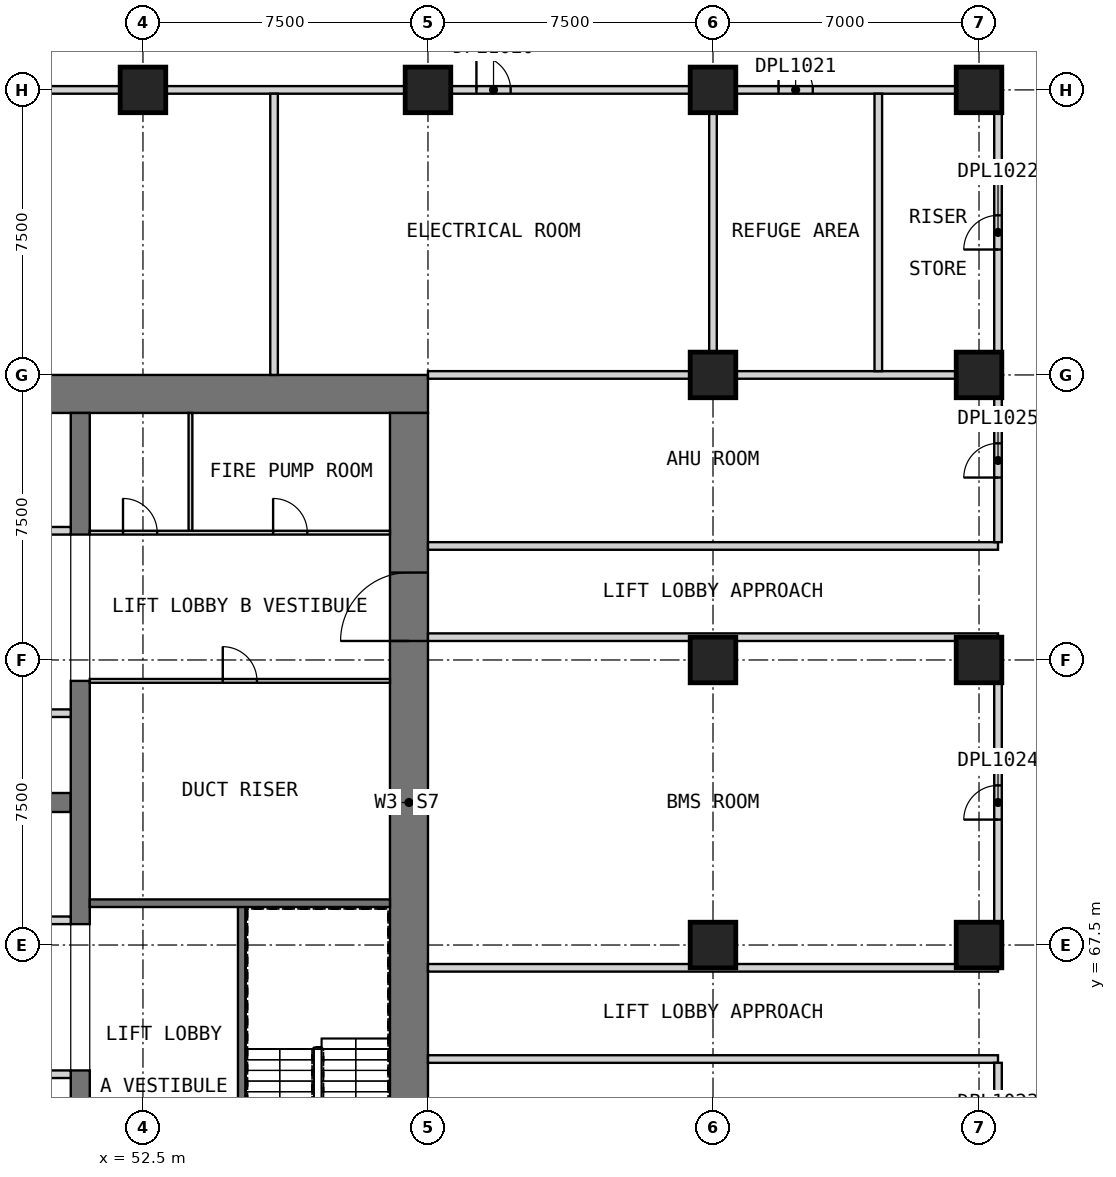
"""IFC4 building model, lengths in metres.
Left out: names, types, materials, properties, quantities, classifications, styles, units other than length and angle.
Written with IfcOpenShell. Run it as: python <this file> out.ifc"""

import sys

from ifc_helpers import new_model, si_unit, direction, frame, frame_2d, origin, origin_2d, place, context, subcontext, project, spatial, rectangle, extrude, element, fill, save


model = new_model("IFC4")
c1 = context("Model", 3, precision=1e-05, world=origin(), true_north=direction((0.0, 1.0)))
c2 = subcontext(c1, "Body", "Model", "MODEL_VIEW")
j1 = project(units=[si_unit("LENGTHUNIT", "METRE"), si_unit("PLANEANGLEUNIT", "RADIAN")], contexts=[c1])
p1 = place(None, origin())
s1 = spatial("IfcSite", under=j1, at=p1, CompositionType="ELEMENT")
p2 = place(p1, origin())
s2 = spatial("IfcBuilding", under=s1, at=p2, CompositionType="ELEMENT")
p3 = place(p2, frame((0.0, 0.0, 73.6)))
s3 = spatial("IfcBuildingStorey", under=s2, at=p3, CompositionType="ELEMENT", Elevation=73.6)
for number, where, z_axis, x_axis in (
    (1, (52.5, 90.0, 0.0), (0.0, 0.0, 1.0), (1.0, 0.0, 0.0)),
    (2, (60.0, 90.0, 0.0), (0.0, 0.0, 1.0), (1.0, 0.0, 0.0)),
    (3, (67.5, 67.5, 0.0), (0.0, 0.0, 1.0), (1.0, 0.0, 0.0)),
    (4, (67.5, 75.0, 0.0), (0.0, 0.0, 1.0), (1.0, 0.0, 0.0)),
    (5, (67.5, 82.5, 0.0), (0.0, 0.0, 1.0), (1.0, 0.0, 0.0)),
    (6, (67.5, 90.0, 0.0), (0.0, 0.0, 1.0), (1.0, 0.0, 0.0)),
    (7, (74.5, 67.5, 0.0), (0.0, 0.0, 1.0), (1.0, 0.0, 0.0)),
    (8, (74.5, 75.0, 0.0), (0.0, 0.0, 1.0), (1.0, 0.0, 0.0)),
    (9, (74.5, 82.5, 0.0), (0.0, 0.0, 1.0), (1.0, 0.0, 0.0)),
    (10, (74.5, 90.0, 0.0), (0.0, 0.0, 1.0), (1.0, 0.0, 0.0)),
):
    element("IfcColumn", number, at=place(p3, frame(where, z_axis=z_axis, x_axis=x_axis)), inside=s3, PredefinedType="COLUMN", context=c2, shape_type="SweptSolid", body=[
        extrude(rectangle(XDim=1.2, YDim=1.2, at=origin_2d()), origin(), (0.0, 0.0, 1.0), 5.5),
    ])
p4 = place(p3, frame((30.0, 82.0, 0.0), z_axis=(0.0, 0.0, 1.0), x_axis=(1.0, 0.0, 0.0)))
e11 = element("IfcWall", 11, at=p4, inside=s3, PredefinedType="SHEAR", context=c2, shape_type="SweptSolid", body=[
    extrude(rectangle(XDim=30.0, YDim=1.0, at=frame_2d((15.0, 0.0))), origin(), (0.0, 0.0, 1.0), 5.5),
])
p5 = place(p3, frame((59.5, 61.0, 0.0), z_axis=(0.0, 0.0, 1.0), x_axis=(0.0, 1.0, 0.0)))
e12 = element("IfcWall", 12, at=p5, inside=s3, PredefinedType="SHEAR", context=c2, shape_type="SweptSolid", body=[
    extrude(rectangle(XDim=20.5, YDim=1.0, at=frame_2d((10.25, 0.0))), origin(), (0.0, 0.0, 1.0), 5.5),
])
p6 = place(p5, frame((14.5, 0.0, 0.0)))
e13 = element("IfcOpeningElement", 13, at=p6, cuts=e12, PredefinedType="OPENING", context=c2, shape_type="SweptSolid", body=[
    extrude(rectangle(XDim=1.8, YDim=2.1, at=frame_2d((0.9, 1.05))), frame((0.0, 0.51, 0.0), z_axis=(0.0, -1.0, 0.0), x_axis=(1.0, 0.0, 0.0)), (0.0, 0.0, 1.0), 1.02),
])
p7 = place(p3, frame((35.0, 71.25, 0.0), z_axis=(0.0, 0.0, 1.0), x_axis=(1.0, 0.0, 0.0)))
e14 = element("IfcWall", 14, at=p7, inside=s3, PredefinedType="SHEAR", context=c2, shape_type="SweptSolid", body=[
    extrude(rectangle(XDim=15.6, YDim=0.5, at=frame_2d((7.8, 0.0))), origin(), (0.0, 0.0, 1.0), 5.5),
])
p8 = place(p3, frame((50.85, 61.0, 0.0), z_axis=(0.0, 0.0, 1.0), x_axis=(0.0, 1.0, 0.0)))
e15 = element("IfcWall", 15, at=p8, inside=s3, PredefinedType="SHEAR", context=c2, shape_type="SweptSolid", body=[
    extrude(rectangle(XDim=3.2, YDim=0.5, at=frame_2d((1.6, 0.0))), origin(), (0.0, 0.0, 1.0), 5.5),
])
p9 = place(p3, frame((50.85, 68.05, 0.0), z_axis=(0.0, 0.0, 1.0), x_axis=(0.0, 1.0, 0.0)))
e16 = element("IfcWall", 16, at=p9, inside=s3, PredefinedType="SHEAR", context=c2, shape_type="SweptSolid", body=[
    extrude(rectangle(XDim=6.4, YDim=0.5, at=frame_2d((3.2, 0.0))), origin(), (0.0, 0.0, 1.0), 5.5),
])
p10 = place(p3, frame((50.85, 78.3, 0.0), z_axis=(0.0, 0.0, 1.0), x_axis=(0.0, 1.0, 0.0)))
e17 = element("IfcWall", 17, at=p10, inside=s3, PredefinedType="SHEAR", context=c2, shape_type="SweptSolid", body=[
    extrude(rectangle(XDim=3.2, YDim=0.5, at=frame_2d((1.6, 0.0))), origin(), (0.0, 0.0, 1.0), 5.5),
])
p11 = place(p3, frame((48.0, 64.1, 0.0), z_axis=(0.0, 0.0, 1.0), x_axis=(1.0, 0.0, 0.0)))
e18 = element("IfcWall", 18, at=p11, inside=s3, PredefinedType="PARTITIONING", context=c2, shape_type="SweptSolid", body=[
    extrude(rectangle(XDim=2.6, YDim=0.2, at=frame_2d((1.3, 0.0))), origin(), (0.0, 0.0, 1.0), 5.25),
])
p12 = place(p11, frame((0.85, 0.0, 0.0)))
e19 = element("IfcOpeningElement", 19, at=p12, cuts=e18, PredefinedType="OPENING", context=c2, shape_type="SweptSolid", body=[
    extrude(rectangle(XDim=0.9, YDim=2.1, at=frame_2d((0.45, 1.05))), frame((0.0, 0.11, 0.0), z_axis=(0.0, -1.0, 0.0), x_axis=(1.0, 0.0, 0.0)), (0.0, 0.0, 1.0), 0.22),
])
p13 = place(p3, frame((48.0, 68.15, 0.0), z_axis=(0.0, 0.0, 1.0), x_axis=(1.0, 0.0, 0.0)))
e20 = element("IfcWall", 20, at=p13, inside=s3, PredefinedType="PARTITIONING", context=c2, shape_type="SweptSolid", body=[
    extrude(rectangle(XDim=2.6, YDim=0.2, at=frame_2d((1.3, 0.0))), origin(), (0.0, 0.0, 1.0), 5.25),
])
p14 = place(p13, frame((0.85, 0.0, 0.0)))
e21 = element("IfcOpeningElement", 21, at=p14, cuts=e20, PredefinedType="OPENING", context=c2, shape_type="SweptSolid", body=[
    extrude(rectangle(XDim=0.9, YDim=2.1, at=frame_2d((0.45, 1.05))), frame((0.0, 0.11, 0.0), z_axis=(0.0, -1.0, 0.0), x_axis=(1.0, 0.0, 0.0)), (0.0, 0.0, 1.0), 0.22),
])
p15 = place(p3, frame((35.0, 73.6, 0.0), z_axis=(0.0, 0.0, 1.0), x_axis=(1.0, 0.0, 0.0)))
e22 = element("IfcWall", 22, at=p15, inside=s3, PredefinedType="PARTITIONING", context=c2, shape_type="SweptSolid", body=[
    extrude(rectangle(XDim=15.6, YDim=0.2, at=frame_2d((7.8, 0.0))), origin(), (0.0, 0.0, 1.0), 5.25),
])
p16 = place(p15, frame((2.15, 0.0, 0.0)))
e23 = element("IfcOpeningElement", 23, at=p16, cuts=e22, PredefinedType="OPENING", context=c2, shape_type="SweptSolid", body=[
    extrude(rectangle(XDim=0.9, YDim=2.1, at=frame_2d((0.45, 1.05))), frame((0.0, 0.11, 0.0), z_axis=(0.0, -1.0, 0.0), x_axis=(1.0, 0.0, 0.0)), (0.0, 0.0, 1.0), 0.22),
])
p17 = place(p15, frame((9.95, 0.0, 0.0)))
e24 = element("IfcOpeningElement", 24, at=p17, cuts=e22, PredefinedType="OPENING", context=c2, shape_type="SweptSolid", body=[
    extrude(rectangle(XDim=0.9, YDim=2.1, at=frame_2d((0.45, 1.05))), frame((0.0, 0.11, 0.0), z_axis=(0.0, -1.0, 0.0), x_axis=(1.0, 0.0, 0.0)), (0.0, 0.0, 1.0), 0.22),
])
p18 = place(p3, frame((35.0, 78.4, 0.0), z_axis=(0.0, 0.0, 1.0), x_axis=(1.0, 0.0, 0.0)))
e25 = element("IfcWall", 25, at=p18, inside=s3, PredefinedType="SOLIDWALL", context=c2, shape_type="SweptSolid", body=[
    extrude(rectangle(XDim=15.6, YDim=0.2, at=frame_2d((7.8, 0.0))), origin(), (0.0, 0.0, 1.0), 5.5),
])
p19 = place(p18, frame((0.75, 0.0, 0.0)))
e26 = element("IfcOpeningElement", 26, at=p19, cuts=e25, PredefinedType="OPENING", context=c2, shape_type="SweptSolid", body=[
    extrude(rectangle(XDim=1.1, YDim=2.1, at=frame_2d((0.55, 1.05))), frame((0.0, 0.11, 0.0), z_axis=(0.0, -1.0, 0.0), x_axis=(1.0, 0.0, 0.0)), (0.0, 0.0, 1.0), 0.22),
])
p20 = place(p18, frame((3.35, 0.0, 0.0)))
e27 = element("IfcOpeningElement", 27, at=p20, cuts=e25, PredefinedType="OPENING", context=c2, shape_type="SweptSolid", body=[
    extrude(rectangle(XDim=1.1, YDim=2.1, at=frame_2d((0.55, 1.05))), frame((0.0, 0.11, 0.0), z_axis=(0.0, -1.0, 0.0), x_axis=(1.0, 0.0, 0.0)), (0.0, 0.0, 1.0), 0.22),
])
p21 = place(p18, frame((11.15, 0.0, 0.0)))
e28 = element("IfcOpeningElement", 28, at=p21, cuts=e25, PredefinedType="OPENING", context=c2, shape_type="SweptSolid", body=[
    extrude(rectangle(XDim=1.1, YDim=2.1, at=frame_2d((0.55, 1.05))), frame((0.0, 0.11, 0.0), z_axis=(0.0, -1.0, 0.0), x_axis=(1.0, 0.0, 0.0)), (0.0, 0.0, 1.0), 0.22),
])
p22 = place(p18, frame((13.75, 0.0, 0.0)))
e29 = element("IfcOpeningElement", 29, at=p22, cuts=e25, PredefinedType="OPENING", context=c2, shape_type="SweptSolid", body=[
    extrude(rectangle(XDim=1.1, YDim=2.1, at=frame_2d((0.55, 1.05))), frame((0.0, 0.11, 0.0), z_axis=(0.0, -1.0, 0.0), x_axis=(1.0, 0.0, 0.0)), (0.0, 0.0, 1.0), 0.22),
])
p23 = place(p3, frame((55.1, 61.0, 0.0), z_axis=(0.0, 0.0, 1.0), x_axis=(0.0, 1.0, 0.0)))
e30 = element("IfcWall", 30, at=p23, inside=s3, PredefinedType="SOLIDWALL", context=c2, shape_type="SweptSolid", body=[
    extrude(rectangle(XDim=7.6, YDim=0.2, at=frame_2d((3.8, 0.0))), origin(), (0.0, 0.0, 1.0), 5.25),
])
p24 = place(p3, frame((51.1, 68.6, 0.0), z_axis=(0.0, 0.0, 1.0), x_axis=(1.0, 0.0, 0.0)))
e31 = element("IfcWall", 31, at=p24, inside=s3, PredefinedType="SOLIDWALL", context=c2, shape_type="SweptSolid", body=[
    extrude(rectangle(XDim=7.9, YDim=0.2, at=frame_2d((3.95, 0.0))), origin(), (0.0, 0.0, 1.0), 5.25),
])
p25 = place(p3, frame((51.1, 74.45, 0.0), z_axis=(0.0, 0.0, 1.0), x_axis=(1.0, 0.0, 0.0)))
e32 = element("IfcWall", 32, at=p25, inside=s3, PredefinedType="PARTITIONING", context=c2, shape_type="SweptSolid", body=[
    extrude(rectangle(XDim=7.9, YDim=0.1, at=frame_2d((3.95, 0.0))), origin(), (0.0, 0.0, 1.0), 5.25),
])
p26 = place(p25, frame((3.5, 0.0, 0.0)))
e33 = element("IfcOpeningElement", 33, at=p26, cuts=e32, PredefinedType="OPENING", context=c2, shape_type="SweptSolid", body=[
    extrude(rectangle(XDim=0.9, YDim=2.1, at=frame_2d((0.45, 1.05))), frame((0.0, 0.06, 0.0), z_axis=(0.0, -1.0, 0.0), x_axis=(1.0, 0.0, 0.0)), (0.0, 0.0, 1.0), 0.12),
])
p27 = place(p3, frame((51.1, 78.35, 0.0), z_axis=(0.0, 0.0, 1.0), x_axis=(1.0, 0.0, 0.0)))
e34 = element("IfcWall", 34, at=p27, inside=s3, PredefinedType="PARTITIONING", context=c2, shape_type="SweptSolid", body=[
    extrude(rectangle(XDim=7.9, YDim=0.1, at=frame_2d((3.95, 0.0))), origin(), (0.0, 0.0, 1.0), 5.25),
])
p28 = place(p27, frame((0.875, 0.0, 0.0)))
e35 = element("IfcOpeningElement", 35, at=p28, cuts=e34, PredefinedType="OPENING", context=c2, shape_type="SweptSolid", body=[
    extrude(rectangle(XDim=0.9, YDim=2.1, at=frame_2d((0.45, 1.05))), frame((0.0, 0.06, 0.0), z_axis=(0.0, -1.0, 0.0), x_axis=(1.0, 0.0, 0.0)), (0.0, 0.0, 1.0), 0.12),
])
p29 = place(p27, frame((4.825, 0.0, 0.0)))
e36 = element("IfcOpeningElement", 36, at=p29, cuts=e34, PredefinedType="OPENING", context=c2, shape_type="SweptSolid", body=[
    extrude(rectangle(XDim=0.9, YDim=2.1, at=frame_2d((0.45, 1.05))), frame((0.0, 0.06, 0.0), z_axis=(0.0, -1.0, 0.0), x_axis=(1.0, 0.0, 0.0)), (0.0, 0.0, 1.0), 0.12),
])
p30 = place(p3, frame((53.75, 78.4, 0.0), z_axis=(0.0, 0.0, 1.0), x_axis=(0.0, 1.0, 0.0)))
e37 = element("IfcWall", 37, at=p30, inside=s3, PredefinedType="PARTITIONING", context=c2, shape_type="SweptSolid", body=[
    extrude(rectangle(XDim=3.1, YDim=0.1, at=frame_2d((1.55, 0.0))), origin(), (0.0, 0.0, 1.0), 5.25),
])
for number, where, z_axis, x_axis in (
    (38, (60.0, 64.5, 0.0), (0.0, 0.0, 1.0), (1.0, 0.0, 0.0)),
    (39, (60.0, 66.9, 0.0), (0.0, 0.0, 1.0), (1.0, 0.0, 0.0)),
    (40, (60.0, 75.6, 0.0), (0.0, 0.0, 1.0), (1.0, 0.0, 0.0)),
    (41, (60.0, 78.0, 0.0), (0.0, 0.0, 1.0), (1.0, 0.0, 0.0)),
):
    element("IfcWall", number, at=place(p3, frame(where, z_axis=z_axis, x_axis=x_axis)), inside=s3, PredefinedType="PARTITIONING", context=c2, shape_type="SweptSolid", body=[
        extrude(rectangle(XDim=15.0, YDim=0.2, at=frame_2d((7.5, 0.0))), origin(), (0.0, 0.0, 1.0), 5.25),
    ])
p31 = place(p3, frame((60.0, 82.5, 0.0), z_axis=(0.0, 0.0, 1.0), x_axis=(1.0, 0.0, 0.0)))
e42 = element("IfcWall", 42, at=p31, inside=s3, PredefinedType="PARTITIONING", context=c2, shape_type="SweptSolid", body=[
    extrude(rectangle(XDim=14.9, YDim=0.2, at=frame_2d((7.45, 0.0))), origin(), (0.0, 0.0, 1.0), 5.25),
])
p32 = place(p3, frame((30.0, 90.0, 0.0), z_axis=(0.0, 0.0, 1.0), x_axis=(1.0, 0.0, 0.0)))
e43 = element("IfcWall", 43, at=p32, inside=s3, PredefinedType="PARTITIONING", context=c2, shape_type="SweptSolid", body=[
    extrude(rectangle(XDim=45.0, YDim=0.2, at=frame_2d((22.5, 0.0))), origin(), (0.0, 0.0, 1.0), 5.25),
])
p33 = place(p32, frame((12.525, 0.0, 0.0)))
e44 = element("IfcOpeningElement", 44, at=p33, cuts=e43, PredefinedType="OPENING", context=c2, shape_type="SweptSolid", body=[
    extrude(rectangle(XDim=0.9, YDim=2.1, at=frame_2d((0.45, 1.05))), frame((0.0, 0.11, 0.0), z_axis=(0.0, -1.0, 0.0), x_axis=(1.0, 0.0, 0.0)), (0.0, 0.0, 1.0), 0.22),
])
p34 = place(p32, frame((31.275, 0.0, 0.0)))
e45 = element("IfcOpeningElement", 45, at=p34, cuts=e43, PredefinedType="OPENING", context=c2, shape_type="SweptSolid", body=[
    extrude(rectangle(XDim=0.9, YDim=2.1, at=frame_2d((0.45, 1.05))), frame((0.0, 0.11, 0.0), z_axis=(0.0, -1.0, 0.0), x_axis=(1.0, 0.0, 0.0)), (0.0, 0.0, 1.0), 0.22),
])
p35 = place(p32, frame((39.225, 0.0, 0.0)))
e46 = element("IfcOpeningElement", 46, at=p35, cuts=e43, PredefinedType="OPENING", context=c2, shape_type="SweptSolid", body=[
    extrude(rectangle(XDim=0.9, YDim=2.1, at=frame_2d((0.45, 1.05))), frame((0.0, 0.11, 0.0), z_axis=(0.0, -1.0, 0.0), x_axis=(1.0, 0.0, 0.0)), (0.0, 0.0, 1.0), 0.22),
])
p36 = place(p3, frame((55.95, 82.5, 0.0), z_axis=(0.0, 0.0, 1.0), x_axis=(0.0, 1.0, 0.0)))
e47 = element("IfcWall", 47, at=p36, inside=s3, PredefinedType="PARTITIONING", context=c2, shape_type="SweptSolid", body=[
    extrude(rectangle(XDim=7.4, YDim=0.2, at=frame_2d((3.7, 0.0))), origin(), (0.0, 0.0, 1.0), 5.25),
])
for number, where, z_axis, x_axis in (
    (48, (67.5, 82.6, 0.0), (0.0, 0.0, 1.0), (0.0, 1.0, 0.0)),
    (49, (71.85, 82.6, 0.0), (0.0, 0.0, 1.0), (0.0, 1.0, 0.0)),
):
    element("IfcWall", number, at=place(p3, frame(where, z_axis=z_axis, x_axis=x_axis)), inside=s3, PredefinedType="PARTITIONING", context=c2, shape_type="SweptSolid", body=[
        extrude(rectangle(XDim=7.3, YDim=0.2, at=frame_2d((3.65, 0.0))), origin(), (0.0, 0.0, 1.0), 5.25),
    ])
p37 = place(p3, frame((75.0, 52.6, 0.0), z_axis=(0.0, 0.0, 1.0), x_axis=(0.0, 1.0, 0.0)))
e50 = element("IfcWall", 50, at=p37, inside=s3, PredefinedType="PARTITIONING", context=c2, shape_type="SweptSolid", body=[
    extrude(rectangle(XDim=11.8, YDim=0.2, at=frame_2d((5.9, 0.0))), origin(), (0.0, 0.0, 1.0), 5.25),
])
p38 = place(p37, frame((9.2, 0.0, 0.0)))
e51 = element("IfcOpeningElement", 51, at=p38, cuts=e50, PredefinedType="OPENING", context=c2, shape_type="SweptSolid", body=[
    extrude(rectangle(XDim=0.9, YDim=2.1, at=frame_2d((0.45, 1.05))), frame((0.0, 0.11, 0.0), z_axis=(0.0, -1.0, 0.0), x_axis=(1.0, 0.0, 0.0)), (0.0, 0.0, 1.0), 0.22),
])
p39 = place(p3, frame((75.0, 67.0, 0.0), z_axis=(0.0, 0.0, 1.0), x_axis=(0.0, 1.0, 0.0)))
e52 = element("IfcWall", 52, at=p39, inside=s3, PredefinedType="PARTITIONING", context=c2, shape_type="SweptSolid", body=[
    extrude(rectangle(XDim=8.5, YDim=0.2, at=frame_2d((4.25, 0.0))), origin(), (0.0, 0.0, 1.0), 5.25),
])
p40 = place(p39, frame((3.8, 0.0, 0.0)))
e53 = element("IfcOpeningElement", 53, at=p40, cuts=e52, PredefinedType="OPENING", context=c2, shape_type="SweptSolid", body=[
    extrude(rectangle(XDim=0.9, YDim=2.1, at=frame_2d((0.45, 1.05))), frame((0.0, 0.11, 0.0), z_axis=(0.0, -1.0, 0.0), x_axis=(1.0, 0.0, 0.0)), (0.0, 0.0, 1.0), 0.22),
])
p41 = place(p3, frame((75.0, 78.1, 0.0), z_axis=(0.0, 0.0, 1.0), x_axis=(0.0, 1.0, 0.0)))
e54 = element("IfcWall", 54, at=p41, inside=s3, PredefinedType="PARTITIONING", context=c2, shape_type="SweptSolid", body=[
    extrude(rectangle(XDim=11.8, YDim=0.2, at=frame_2d((5.9, 0.0))), origin(), (0.0, 0.0, 1.0), 5.25),
])
p42 = place(p41, frame((7.7, 0.0, 0.0)))
e55 = element("IfcOpeningElement", 55, at=p42, cuts=e54, PredefinedType="OPENING", context=c2, shape_type="SweptSolid", body=[
    extrude(rectangle(XDim=0.9, YDim=2.1, at=frame_2d((0.45, 1.05))), frame((0.0, 0.11, 0.0), z_axis=(0.0, -1.0, 0.0), x_axis=(1.0, 0.0, 0.0)), (0.0, 0.0, 1.0), 0.22),
])
p43 = place(p41, frame((1.7, 0.0, 0.0)))
e56 = element("IfcOpeningElement", 56, at=p43, cuts=e54, PredefinedType="OPENING", context=c2, shape_type="SweptSolid", body=[
    extrude(rectangle(XDim=0.9, YDim=2.1, at=frame_2d((0.45, 1.05))), frame((0.0, 0.11, 0.0), z_axis=(0.0, -1.0, 0.0), x_axis=(1.0, 0.0, 0.0)), (0.0, 0.0, 1.0), 0.22),
])
p44 = place(p6, origin())
e57 = element("IfcDoor", 57, at=p44, inside=s3, OperationType="DOUBLE_DOOR_SINGLE_SWING", PredefinedType="DOOR", context=c2, shape_type="SweptSolid", body=[
    extrude(rectangle(XDim=1.8, YDim=2.1, at=frame_2d((0.9, 1.05))), frame((0.0, 0.025, 0.0), z_axis=(0.0, -1.0, 0.0), x_axis=(1.0, 0.0, 0.0)), (0.0, 0.0, 1.0), 0.05),
])
fill(e13, e57)
p45 = place(p26, origin())
e58 = element("IfcDoor", 58, at=p45, inside=s3, OperationType="SINGLE_SWING_LEFT", PredefinedType="DOOR", context=c2, shape_type="SweptSolid", body=[
    extrude(rectangle(XDim=0.9, YDim=2.1, at=frame_2d((0.45, 1.05))), frame((0.0, 0.025, 0.0), z_axis=(0.0, -1.0, 0.0), x_axis=(1.0, 0.0, 0.0)), (0.0, 0.0, 1.0), 0.05),
])
fill(e33, e58)
p46 = place(p28, origin())
e59 = element("IfcDoor", 59, at=p46, inside=s3, OperationType="SINGLE_SWING_LEFT", PredefinedType="DOOR", context=c2, shape_type="SweptSolid", body=[
    extrude(rectangle(XDim=0.9, YDim=2.1, at=frame_2d((0.45, 1.05))), frame((0.0, 0.025, 0.0), z_axis=(0.0, -1.0, 0.0), x_axis=(1.0, 0.0, 0.0)), (0.0, 0.0, 1.0), 0.05),
])
fill(e35, e59)
p47 = place(p29, origin())
e60 = element("IfcDoor", 60, at=p47, inside=s3, OperationType="SINGLE_SWING_RIGHT", PredefinedType="DOOR", context=c2, shape_type="SweptSolid", body=[
    extrude(rectangle(XDim=0.9, YDim=2.1, at=frame_2d((0.45, 1.05))), frame((0.0, 0.025, 0.0), z_axis=(0.0, -1.0, 0.0), x_axis=(1.0, 0.0, 0.0)), (0.0, 0.0, 1.0), 0.05),
])
fill(e36, e60)
p48 = place(p34, origin())
e61 = element("IfcDoor", 61, at=p48, inside=s3, OperationType="SINGLE_SWING_LEFT", PredefinedType="DOOR", context=c2, shape_type="SweptSolid", body=[
    extrude(rectangle(XDim=0.9, YDim=2.1, at=frame_2d((0.45, 1.05))), frame((0.0, 0.025, 0.0), z_axis=(0.0, -1.0, 0.0), x_axis=(1.0, 0.0, 0.0)), (0.0, 0.0, 1.0), 0.05),
])
fill(e45, e61)
p49 = place(p35, origin())
e62 = element("IfcDoor", 62, at=p49, inside=s3, OperationType="SINGLE_SWING_RIGHT", PredefinedType="DOOR", context=c2, shape_type="SweptSolid", body=[
    extrude(rectangle(XDim=0.9, YDim=2.1, at=frame_2d((0.45, 1.05))), frame((0.0, 0.025, 0.0), z_axis=(0.0, -1.0, 0.0), x_axis=(1.0, 0.0, 0.0)), (0.0, 0.0, 1.0), 0.05),
])
fill(e46, e62)
p50 = place(p42, origin())
e63 = element("IfcDoor", 63, at=p50, inside=s3, OperationType="SINGLE_SWING_LEFT", PredefinedType="DOOR", context=c2, shape_type="SweptSolid", body=[
    extrude(rectangle(XDim=0.9, YDim=2.1, at=frame_2d((0.45, 1.05))), frame((0.0, 0.025, 0.0), z_axis=(0.0, -1.0, 0.0), x_axis=(1.0, 0.0, 0.0)), (0.0, 0.0, 1.0), 0.05),
])
fill(e55, e63)
p51 = place(p40, origin())
e64 = element("IfcDoor", 64, at=p51, inside=s3, OperationType="SINGLE_SWING_LEFT", PredefinedType="DOOR", context=c2, shape_type="SweptSolid", body=[
    extrude(rectangle(XDim=0.9, YDim=2.1, at=frame_2d((0.45, 1.05))), frame((0.0, 0.025, 0.0), z_axis=(0.0, -1.0, 0.0), x_axis=(1.0, 0.0, 0.0)), (0.0, 0.0, 1.0), 0.05),
])
fill(e53, e64)
p52 = place(p43, origin())
e65 = element("IfcDoor", 65, at=p52, inside=s3, OperationType="SINGLE_SWING_LEFT", PredefinedType="DOOR", context=c2, shape_type="SweptSolid", body=[
    extrude(rectangle(XDim=0.9, YDim=2.1, at=frame_2d((0.45, 1.05))), frame((0.0, 0.025, 0.0), z_axis=(0.0, -1.0, 0.0), x_axis=(1.0, 0.0, 0.0)), (0.0, 0.0, 1.0), 0.05),
])
fill(e56, e65)
save(model, sys.argv[1])
